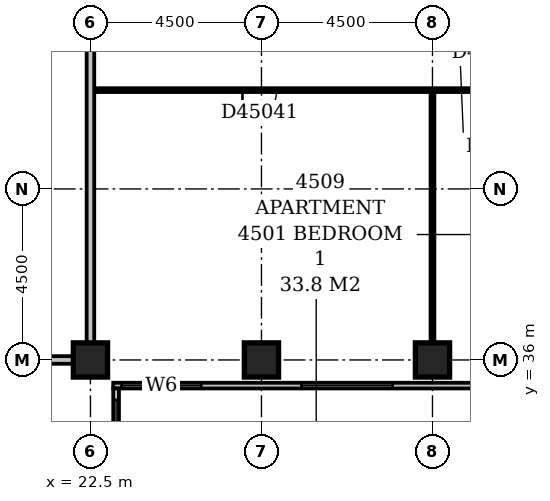
"""IFC4 building model, lengths in metres.
Left out: names, types, materials, properties, quantities, classifications, styles, units other than length and angle.
Written with IfcOpenShell. Run it as: python <this file> out.ifc"""

import sys

from ifc_helpers import new_model, si_unit, direction, frame, frame_2d, origin, origin_2d, place, context, subcontext, project, spatial, rectangle, extrude, element, fill, save


model = new_model("IFC4")
c1 = context("Model", 3, precision=1e-05, world=origin(), true_north=direction((0.0, 1.0)))
c2 = subcontext(c1, "Body", "Model", "MODEL_VIEW")
j1 = project(units=[si_unit("LENGTHUNIT", "METRE"), si_unit("PLANEANGLEUNIT", "RADIAN")], contexts=[c1])
p1 = place(None, origin())
s1 = spatial("IfcSite", under=j1, at=p1, CompositionType="ELEMENT")
p2 = place(p1, origin())
s2 = spatial("IfcBuilding", under=s1, at=p2, CompositionType="ELEMENT")
p3 = place(p2, frame((0.0, 0.0, 179.0)))
s3 = spatial("IfcBuildingStorey", under=s2, at=p3, CompositionType="ELEMENT", Elevation=179.0)
for number, where, z_axis, x_axis in (
    (1, (22.5, 36.0, -0.3), (0.0, 0.0, 1.0), (1.0, 0.0, 0.0)),
    (2, (27.0, 36.0, -0.3), (0.0, 0.0, 1.0), (1.0, 0.0, 0.0)),
    (3, (31.5, 36.0, -0.3), (0.0, 0.0, 1.0), (1.0, 0.0, 0.0)),
):
    element("IfcColumn", number, at=place(p3, frame(where, z_axis=z_axis, x_axis=x_axis)), inside=s3, PredefinedType="COLUMN", context=c2, shape_type="SweptSolid", body=[
        extrude(rectangle(XDim=0.9, YDim=0.9, at=origin_2d()), origin(), (0.0, 0.0, 1.0), 3.6),
    ])
p4 = place(p3, frame((23.175, 17.4, 0.0), z_axis=(0.0, 0.0, 1.0), x_axis=(0.0, 1.0, 0.0)))
e4 = element("IfcWall", 4, at=p4, inside=s3, PredefinedType="STANDARD", context=c2, shape_type="SweptSolid", body=[
    extrude(rectangle(XDim=17.85, YDim=0.15, at=frame_2d((8.925, 0.0))), origin(), (0.0, 0.0, 1.0), 2.7),
])
p5 = place(p4, frame((1.257, 0.0, 0.6)))
e5 = element("IfcOpeningElement", 5, at=p5, cuts=e4, PredefinedType="OPENING", context=c2, shape_type="SweptSolid", body=[
    extrude(rectangle(XDim=2.1, YDim=1.8, at=frame_2d((1.05, 0.9))), frame((0.0, 0.087, 0.0), z_axis=(0.0, -1.0, 0.0), x_axis=(1.0, 0.0, 0.0)), (0.0, 0.0, 1.0), 0.174),
])
p6 = place(p4, frame((6.15, 0.0, 0.6)))
e6 = element("IfcOpeningElement", 6, at=p6, cuts=e4, PredefinedType="OPENING", context=c2, shape_type="SweptSolid", body=[
    extrude(rectangle(XDim=2.4, YDim=1.8, at=frame_2d((1.2, 0.9))), frame((0.0, 0.087, 0.0), z_axis=(0.0, -1.0, 0.0), x_axis=(1.0, 0.0, 0.0)), (0.0, 0.0, 1.0), 0.174),
])
p7 = place(p4, frame((10.65, 0.0, 0.6)))
e7 = element("IfcOpeningElement", 7, at=p7, cuts=e4, PredefinedType="OPENING", context=c2, shape_type="SweptSolid", body=[
    extrude(rectangle(XDim=2.4, YDim=1.8, at=frame_2d((1.2, 0.9))), frame((0.0, 0.087, 0.0), z_axis=(0.0, -1.0, 0.0), x_axis=(1.0, 0.0, 0.0)), (0.0, 0.0, 1.0), 0.174),
])
p8 = place(p4, frame((15.15, 0.0, 0.6)))
e8 = element("IfcOpeningElement", 8, at=p8, cuts=e4, PredefinedType="OPENING", context=c2, shape_type="SweptSolid", body=[
    extrude(rectangle(XDim=2.4, YDim=1.8, at=frame_2d((1.2, 0.9))), frame((0.0, 0.087, 0.0), z_axis=(0.0, -1.0, 0.0), x_axis=(1.0, 0.0, 0.0)), (0.0, 0.0, 1.0), 0.174),
])
p9 = place(p3, frame((23.1, 35.325, 0.0), z_axis=(0.0, 0.0, 1.0), x_axis=(1.0, 0.0, 0.0)))
e9 = element("IfcWall", 9, at=p9, inside=s3, PredefinedType="STANDARD", context=c2, shape_type="SweptSolid", body=[
    extrude(rectangle(XDim=45.15, YDim=0.15, at=frame_2d((22.575, 0.0))), origin(), (0.0, 0.0, 1.0), 2.7),
])
p10 = place(p9, frame((0.217, 0.0, 0.6)))
e10 = element("IfcOpeningElement", 10, at=p10, cuts=e9, PredefinedType="OPENING", context=c2, shape_type="SweptSolid", body=[
    extrude(rectangle(XDim=2.1, YDim=1.8, at=frame_2d((1.05, 0.9))), frame((0.0, 0.087, 0.0), z_axis=(0.0, -1.0, 0.0), x_axis=(1.0, 0.0, 0.0)), (0.0, 0.0, 1.0), 0.174),
])
p11 = place(p9, frame((4.95, 0.0, 0.6)))
e11 = element("IfcOpeningElement", 11, at=p11, cuts=e9, PredefinedType="OPENING", context=c2, shape_type="SweptSolid", body=[
    extrude(rectangle(XDim=2.4, YDim=1.8, at=frame_2d((1.2, 0.9))), frame((0.0, 0.087, 0.0), z_axis=(0.0, -1.0, 0.0), x_axis=(1.0, 0.0, 0.0)), (0.0, 0.0, 1.0), 0.174),
])
p12 = place(p9, frame((9.45, 0.0, 0.6)))
e12 = element("IfcOpeningElement", 12, at=p12, cuts=e9, PredefinedType="OPENING", context=c2, shape_type="SweptSolid", body=[
    extrude(rectangle(XDim=2.4, YDim=1.8, at=frame_2d((1.2, 0.9))), frame((0.0, 0.087, 0.0), z_axis=(0.0, -1.0, 0.0), x_axis=(1.0, 0.0, 0.0)), (0.0, 0.0, 1.0), 0.174),
])
p13 = place(p9, frame((13.95, 0.0, 0.6)))
e13 = element("IfcOpeningElement", 13, at=p13, cuts=e9, PredefinedType="OPENING", context=c2, shape_type="SweptSolid", body=[
    extrude(rectangle(XDim=2.4, YDim=1.8, at=frame_2d((1.2, 0.9))), frame((0.0, 0.087, 0.0), z_axis=(0.0, -1.0, 0.0), x_axis=(1.0, 0.0, 0.0)), (0.0, 0.0, 1.0), 0.174),
])
p14 = place(p9, frame((18.45, 0.0, 0.6)))
e14 = element("IfcOpeningElement", 14, at=p14, cuts=e9, PredefinedType="OPENING", context=c2, shape_type="SweptSolid", body=[
    extrude(rectangle(XDim=2.4, YDim=1.8, at=frame_2d((1.2, 0.9))), frame((0.0, 0.087, 0.0), z_axis=(0.0, -1.0, 0.0), x_axis=(1.0, 0.0, 0.0)), (0.0, 0.0, 1.0), 0.174),
])
p15 = place(p9, frame((24.403, 0.0, 0.6)))
e15 = element("IfcOpeningElement", 15, at=p15, cuts=e9, PredefinedType="OPENING", context=c2, shape_type="SweptSolid", body=[
    extrude(rectangle(XDim=1.2, YDim=1.8, at=frame_2d((0.6, 0.9))), frame((0.0, 0.087, 0.0), z_axis=(0.0, -1.0, 0.0), x_axis=(1.0, 0.0, 0.0)), (0.0, 0.0, 1.0), 0.174),
])
p16 = place(p9, frame((27.141, 0.0, 0.6)))
e16 = element("IfcOpeningElement", 16, at=p16, cuts=e9, PredefinedType="OPENING", context=c2, shape_type="SweptSolid", body=[
    extrude(rectangle(XDim=2.1, YDim=1.8, at=frame_2d((1.05, 0.9))), frame((0.0, 0.087, 0.0), z_axis=(0.0, -1.0, 0.0), x_axis=(1.0, 0.0, 0.0)), (0.0, 0.0, 1.0), 0.174),
])
p17 = place(p9, frame((31.95, 0.0, 0.6)))
e17 = element("IfcOpeningElement", 17, at=p17, cuts=e9, PredefinedType="OPENING", context=c2, shape_type="SweptSolid", body=[
    extrude(rectangle(XDim=2.4, YDim=1.8, at=frame_2d((1.2, 0.9))), frame((0.0, 0.087, 0.0), z_axis=(0.0, -1.0, 0.0), x_axis=(1.0, 0.0, 0.0)), (0.0, 0.0, 1.0), 0.174),
])
p18 = place(p9, frame((36.45, 0.0, 0.6)))
e18 = element("IfcOpeningElement", 18, at=p18, cuts=e9, PredefinedType="OPENING", context=c2, shape_type="SweptSolid", body=[
    extrude(rectangle(XDim=2.4, YDim=1.8, at=frame_2d((1.2, 0.9))), frame((0.0, 0.087, 0.0), z_axis=(0.0, -1.0, 0.0), x_axis=(1.0, 0.0, 0.0)), (0.0, 0.0, 1.0), 0.174),
])
p19 = place(p9, frame((40.95, 0.0, 0.6)))
e19 = element("IfcOpeningElement", 19, at=p19, cuts=e9, PredefinedType="OPENING", context=c2, shape_type="SweptSolid", body=[
    extrude(rectangle(XDim=2.4, YDim=1.8, at=frame_2d((1.2, 0.9))), frame((0.0, 0.087, 0.0), z_axis=(0.0, -1.0, 0.0), x_axis=(1.0, 0.0, 0.0)), (0.0, 0.0, 1.0), 0.174),
])
p20 = place(p3, frame((9.1, 36.0, 0.0), z_axis=(0.0, 0.0, 1.0), x_axis=(1.0, 0.0, 0.0)))
e20 = element("IfcWall", 20, at=p20, inside=s3, PredefinedType="PARTITIONING", context=c2, shape_type="SweptSolid", body=[
    extrude(rectangle(XDim=12.95, YDim=0.2, at=frame_2d((6.475, 0.0))), origin(), (0.0, 0.0, 1.0), 3.3),
])
p21 = place(p3, frame((22.5, 36.45, 0.0), z_axis=(0.0, 0.0, 1.0), x_axis=(0.0, 1.0, 0.0)))
e21 = element("IfcWall", 21, at=p21, inside=s3, PredefinedType="PARTITIONING", context=c2, shape_type="SweptSolid", body=[
    extrude(rectangle(XDim=13.05, YDim=0.2, at=frame_2d((6.525, 0.0))), origin(), (0.0, 0.0, 1.0), 3.3),
])
p22 = place(p3, frame((31.5, 36.45, 0.0), z_axis=(0.0, 0.0, 1.0), x_axis=(0.0, 1.0, 0.0)))
e22 = element("IfcWall", 22, at=p22, inside=s3, PredefinedType="PARTITIONING", context=c2, shape_type="SweptSolid", body=[
    extrude(rectangle(XDim=6.6, YDim=0.1, at=frame_2d((3.3, 0.0))), origin(), (0.0, 0.0, 1.0), 3.3),
])
p23 = place(p3, frame((22.6, 43.1, 0.0), z_axis=(0.0, 0.0, 1.0), x_axis=(1.0, 0.0, 0.0)))
e23 = element("IfcWall", 23, at=p23, inside=s3, PredefinedType="PARTITIONING", context=c2, shape_type="SweptSolid", body=[
    extrude(rectangle(XDim=17.8, YDim=0.1, at=frame_2d((8.9, 0.0))), origin(), (0.0, 0.0, 1.0), 3.3),
])
p24 = place(p23, frame((3.9, 0.0, 0.0)))
e24 = element("IfcOpeningElement", 24, at=p24, cuts=e23, PredefinedType="OPENING", context=c2, shape_type="SweptSolid", body=[
    extrude(rectangle(XDim=0.9, YDim=2.1, at=frame_2d((0.45, 1.05))), frame((0.0, 0.062, 0.0), z_axis=(0.0, -1.0, 0.0), x_axis=(1.0, 0.0, 0.0)), (0.0, 0.0, 1.0), 0.124),
])
p25 = place(p23, frame((10.7, 0.0, 0.0)))
e25 = element("IfcOpeningElement", 25, at=p25, cuts=e23, PredefinedType="OPENING", context=c2, shape_type="SweptSolid", body=[
    extrude(rectangle(XDim=0.9, YDim=2.1, at=frame_2d((0.45, 1.05))), frame((0.0, 0.062, 0.0), z_axis=(0.0, -1.0, 0.0), x_axis=(1.0, 0.0, 0.0)), (0.0, 0.0, 1.0), 0.124),
])
p26 = place(p23, frame((14.05, 0.0, 0.0)))
e26 = element("IfcOpeningElement", 26, at=p26, cuts=e23, PredefinedType="OPENING", context=c2, shape_type="SweptSolid", body=[
    extrude(rectangle(XDim=0.9, YDim=2.1, at=frame_2d((0.45, 1.05))), frame((0.0, 0.062, 0.0), z_axis=(0.0, -1.0, 0.0), x_axis=(1.0, 0.0, 0.0)), (0.0, 0.0, 1.0), 0.124),
])
p27 = place(p8, origin())
e27 = element("IfcWindow", 27, at=p27, inside=s3, PartitioningType="SINGLE_PANEL", PredefinedType="WINDOW", context=c2, shape_type="SweptSolid", body=[
    extrude(rectangle(XDim=2.4, YDim=1.8, at=frame_2d((1.2, 0.9))), frame((0.0, 0.03, 0.0), z_axis=(0.0, -1.0, 0.0), x_axis=(1.0, 0.0, 0.0)), (0.0, 0.0, 1.0), 0.06),
])
fill(e8, e27)
p28 = place(p10, origin())
e28 = element("IfcWindow", 28, at=p28, inside=s3, PartitioningType="SINGLE_PANEL", PredefinedType="WINDOW", context=c2, shape_type="SweptSolid", body=[
    extrude(rectangle(XDim=2.1, YDim=1.8, at=frame_2d((1.05, 0.9))), frame((0.0, 0.03, 0.0), z_axis=(0.0, -1.0, 0.0), x_axis=(1.0, 0.0, 0.0)), (0.0, 0.0, 1.0), 0.06),
])
fill(e10, e28)
p29 = place(p11, origin())
e29 = element("IfcWindow", 29, at=p29, inside=s3, PartitioningType="SINGLE_PANEL", PredefinedType="WINDOW", context=c2, shape_type="SweptSolid", body=[
    extrude(rectangle(XDim=2.4, YDim=1.8, at=frame_2d((1.2, 0.9))), frame((0.0, 0.03, 0.0), z_axis=(0.0, -1.0, 0.0), x_axis=(1.0, 0.0, 0.0)), (0.0, 0.0, 1.0), 0.06),
])
fill(e11, e29)
p30 = place(p24, frame((0.9, 0.0, 0.0), z_axis=(0.0, 0.0, 1.0), x_axis=(-1.0, 0.0, 0.0)))
e30 = element("IfcDoor", 30, at=p30, inside=s3, OperationType="SINGLE_SWING_RIGHT", PredefinedType="DOOR", context=c2, shape_type="SweptSolid", body=[
    extrude(rectangle(XDim=0.9, YDim=2.1, at=frame_2d((0.45, 1.05))), frame((0.0, 0.025, 0.0), z_axis=(0.0, -1.0, 0.0), x_axis=(1.0, 0.0, 0.0)), (0.0, 0.0, 1.0), 0.05),
])
fill(e24, e30)
save(model, sys.argv[1])
